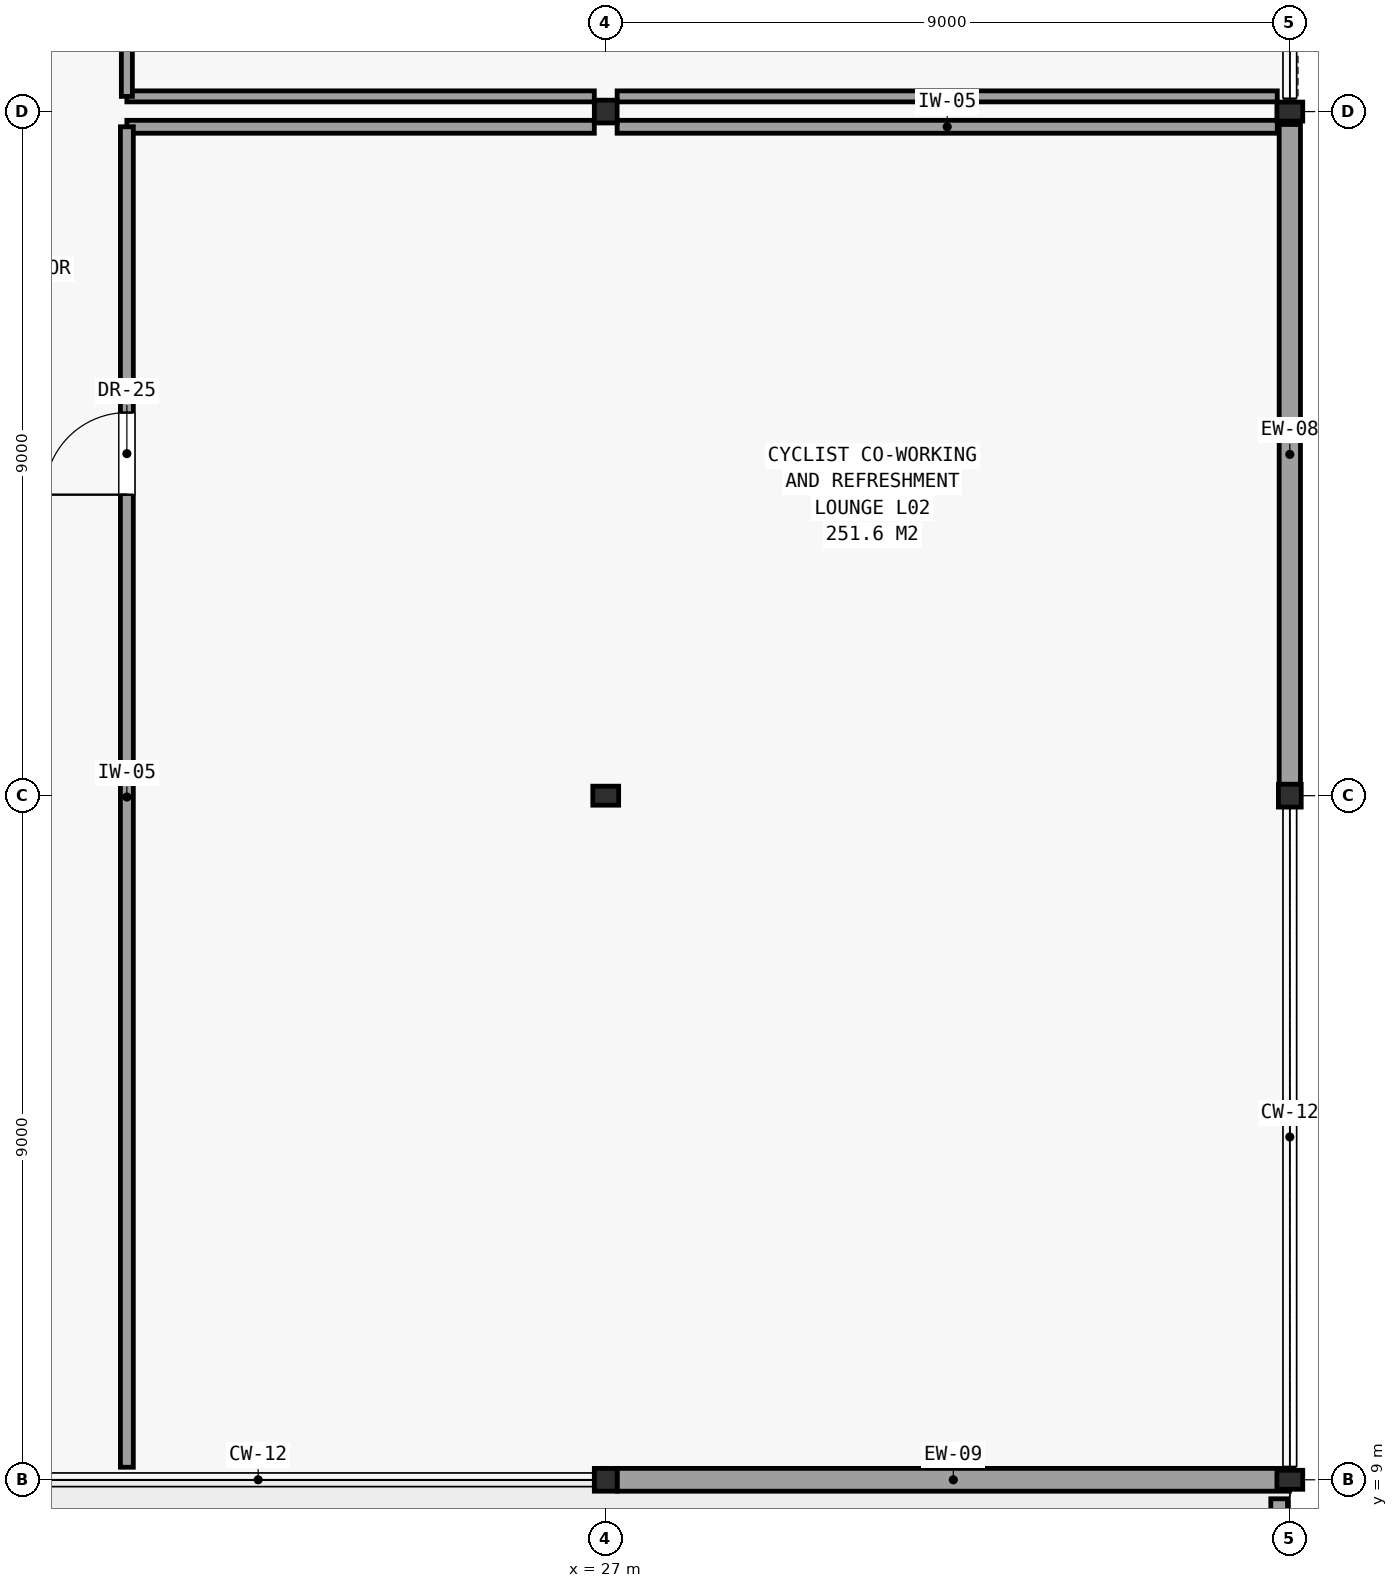
"""IFC4 building model, lengths in metres.
Left out: names, types, materials, properties, quantities, classifications, styles, units other than length and angle.
Written with IfcOpenShell. Run it as: python <this file> out.ifc"""

import sys

from ifc_helpers import new_model, si_unit, direction, frame, frame_2d, origin, origin_2d, place, context, subcontext, project, spatial, rectangle, hollow_rectangle, i_section, extrude, element, fill, save


model = new_model("IFC4")
c1 = context("Model", 3, precision=1e-05, world=origin(), true_north=direction((0.0, 1.0)))
c2 = subcontext(c1, "Body", "Model", "MODEL_VIEW")
j1 = project(units=[si_unit("LENGTHUNIT", "METRE"), si_unit("PLANEANGLEUNIT", "RADIAN")], contexts=[c1])
p1 = place(None, origin())
s1 = spatial("IfcSite", under=j1, at=p1, CompositionType="ELEMENT")
p2 = place(p1, origin())
s2 = spatial("IfcBuilding", under=s1, at=p2, CompositionType="ELEMENT")
p3 = place(p2, frame((0.0, 0.0, 9.3)))
s3 = spatial("IfcBuildingStorey", under=s2, at=p3, CompositionType="ELEMENT", Elevation=9.3)
p4 = place(p3, frame((27.0, 9.0, 0.0), z_axis=(0.0, 0.0, 1.0), x_axis=(1.0, 0.0, 0.0)))
e1 = element("IfcColumn", 1, at=p4, inside=s3, PredefinedType="COLUMN", context=c2, shape_type="SweptSolid", body=[
    extrude(hollow_rectangle(XDim=0.3, YDim=0.3, WallThickness=0.012, at=origin_2d()), origin(), (0.0, 0.0, 1.0), 4.14),
])
p5 = place(p3, frame((27.0, 18.0, 0.0), z_axis=(0.0, 0.0, 1.0), x_axis=(1.0, 0.0, 0.0)))
e2 = element("IfcColumn", 2, at=p5, inside=s3, PredefinedType="COLUMN", context=c2, shape_type="SweptSolid", body=[
    extrude(i_section(OverallWidth=0.25, OverallDepth=0.34, WebThickness=0.009, FlangeThickness=0.014, FilletRadius=0.01, at=origin_2d()), origin(), (0.0, 0.0, 1.0), 4.14),
])
p6 = place(p3, frame((27.0, 27.0, 0.0), z_axis=(0.0, 0.0, 1.0), x_axis=(1.0, 0.0, 0.0)))
e3 = element("IfcColumn", 3, at=p6, inside=s3, PredefinedType="COLUMN", context=c2, shape_type="SweptSolid", body=[
    extrude(hollow_rectangle(XDim=0.3, YDim=0.3, WallThickness=0.012, at=origin_2d()), origin(), (0.0, 0.0, 1.0), 4.14),
])
p7 = place(p3, frame((36.0, 9.0, 0.0), z_axis=(0.0, 0.0, 1.0), x_axis=(1.0, 0.0, 0.0)))
e4 = element("IfcColumn", 4, at=p7, inside=s3, PredefinedType="COLUMN", context=c2, shape_type="SweptSolid", body=[
    extrude(i_section(OverallWidth=0.25, OverallDepth=0.34, WebThickness=0.009, FlangeThickness=0.014, FilletRadius=0.01, at=origin_2d()), origin(), (0.0, 0.0, 1.0), 4.14),
])
p8 = place(p3, frame((36.0, 18.0, 0.0), z_axis=(0.0, 0.0, 1.0), x_axis=(1.0, 0.0, 0.0)))
e5 = element("IfcColumn", 5, at=p8, inside=s3, PredefinedType="COLUMN", context=c2, shape_type="SweptSolid", body=[
    extrude(hollow_rectangle(XDim=0.3, YDim=0.3, WallThickness=0.012, at=origin_2d()), origin(), (0.0, 0.0, 1.0), 4.14),
])
p9 = place(p3, frame((36.0, 27.0, 0.0), z_axis=(0.0, 0.0, 1.0), x_axis=(1.0, 0.0, 0.0)))
e6 = element("IfcColumn", 6, at=p9, inside=s3, PredefinedType="COLUMN", context=c2, shape_type="SweptSolid", body=[
    extrude(i_section(OverallWidth=0.25, OverallDepth=0.34, WebThickness=0.009, FlangeThickness=0.014, FilletRadius=0.01, at=origin_2d()), origin(), (0.0, 0.0, 1.0), 4.14),
])
p10 = place(p3, frame((27.15, 9.0, 0.0), z_axis=(0.0, 0.0, 1.0), x_axis=(1.0, 0.0, 0.0)))
e7 = element("IfcWall", 7, at=p10, inside=s3, PredefinedType="SOLIDWALL", context=c2, shape_type="SweptSolid", body=[
    extrude(rectangle(XDim=8.846, YDim=0.3, at=frame_2d((4.423, 0.0))), origin(), (0.0, 0.0, 1.0), 3.332),
])
p11 = place(p3, frame((36.0, 18.15, 0.0), z_axis=(0.0, 0.0, 1.0), x_axis=(0.0, 1.0, 0.0)))
e8 = element("IfcWall", 8, at=p11, inside=s3, PredefinedType="SOLIDWALL", context=c2, shape_type="SweptSolid", body=[
    extrude(rectangle(XDim=8.68, YDim=0.28, at=frame_2d((4.34, 0.0))), origin(), (0.0, 0.0, 1.0), 3.332),
])
p12 = place(p3, frame((35.86, 8.75, 0.0), z_axis=(0.0, 0.0, 1.0), x_axis=(0.0, -1.0, 0.0)))
e9 = element("IfcWall", 9, at=p12, inside=s3, PredefinedType="PARAPET", context=c2, shape_type="SweptSolid", body=[
    extrude(rectangle(XDim=8.61, YDim=0.22, at=frame_2d((4.305, 0.0))), origin(), (0.0, 0.0, 1.0), 0.52),
])
p13 = place(p3, frame((20.7, 26.8, 0.0), z_axis=(0.0, 0.0, 1.0), x_axis=(1.0, 0.0, 0.0)))
e10 = element("IfcWall", 10, at=p13, inside=s3, PredefinedType="PARTITIONING", context=c2, shape_type="SweptSolid", body=[
    extrude(rectangle(XDim=6.15, YDim=0.17, at=frame_2d((3.075, 0.0))), origin(), (0.0, 0.0, 1.0), 3.332),
])
p14 = place(p3, frame((27.15, 26.8, 0.0), z_axis=(0.0, 0.0, 1.0), x_axis=(1.0, 0.0, 0.0)))
e11 = element("IfcWall", 11, at=p14, inside=s3, PredefinedType="PARTITIONING", context=c2, shape_type="SweptSolid", body=[
    extrude(rectangle(XDim=8.685, YDim=0.17, at=frame_2d((4.343, 0.0))), origin(), (0.0, 0.0, 1.0), 3.332),
])
p15 = place(p3, frame((20.7, 9.165, 0.0), z_axis=(0.0, 0.0, 1.0), x_axis=(0.0, 1.0, 0.0)))
e12 = element("IfcWall", 12, at=p15, inside=s3, PredefinedType="PARTITIONING", context=c2, shape_type="SweptSolid", body=[
    extrude(rectangle(XDim=17.635, YDim=0.17, at=frame_2d((8.817, 0.0))), origin(), (0.0, 0.0, 1.0), 3.332),
])
p16 = place(p15, frame((12.795, 0.0, 0.0)))
e13 = element("IfcOpeningElement", 13, at=p16, cuts=e12, PredefinedType="OPENING", context=c2, shape_type="SweptSolid", body=[
    extrude(rectangle(XDim=1.08, YDim=2.15, at=frame_2d((0.54, 1.075))), frame((0.0, 0.096, 0.0), z_axis=(0.0, -1.0, 0.0), x_axis=(1.0, 0.0, 0.0)), (0.0, 0.0, 1.0), 0.192),
])
p17 = place(p3, frame((20.7, 27.2, 0.0), z_axis=(0.0, 0.0, 1.0), x_axis=(1.0, 0.0, 0.0)))
e14 = element("IfcWall", 14, at=p17, inside=s3, PredefinedType="PARTITIONING", context=c2, shape_type="SweptSolid", body=[
    extrude(rectangle(XDim=6.15, YDim=0.145, at=frame_2d((3.075, 0.0))), origin(), (0.0, 0.0, 1.0), 3.332),
])
p18 = place(p3, frame((27.15, 27.2, 0.0), z_axis=(0.0, 0.0, 1.0), x_axis=(1.0, 0.0, 0.0)))
e15 = element("IfcWall", 15, at=p18, inside=s3, PredefinedType="PARTITIONING", context=c2, shape_type="SweptSolid", body=[
    extrude(rectangle(XDim=8.685, YDim=0.145, at=frame_2d((4.343, 0.0))), origin(), (0.0, 0.0, 1.0), 3.332),
])
p19 = place(p3, frame((20.7, 27.2, 0.0), z_axis=(0.0, 0.0, 1.0), x_axis=(0.0, 1.0, 0.0)))
e16 = element("IfcWall", 16, at=p19, inside=s3, PredefinedType="PARTITIONING", context=c2, shape_type="SweptSolid", body=[
    extrude(rectangle(XDim=16.6, YDim=0.145, at=frame_2d((8.3, 0.0))), origin(), (0.0, 0.0, 1.0), 3.332),
])
p20 = place(p19, frame((12.03, 0.0, 0.0)))
e17 = element("IfcOpeningElement", 17, at=p20, cuts=e16, PredefinedType="OPENING", context=c2, shape_type="SweptSolid", body=[
    extrude(rectangle(XDim=1.14, YDim=2.2, at=frame_2d((0.57, 1.1))), frame((0.0, 0.083, 0.0), z_axis=(0.0, -1.0, 0.0), x_axis=(1.0, 0.0, 0.0)), (0.0, 0.0, 1.0), 0.167),
])
p21 = place(p16, origin())
e18 = element("IfcDoor", 18, at=p21, inside=s3, OperationType="SINGLE_SWING_LEFT", PredefinedType="DOOR", context=c2, shape_type="SweptSolid", body=[
    extrude(rectangle(XDim=1.08, YDim=2.15, at=frame_2d((0.54, 1.075))), frame((0.0, 0.025, 0.0), z_axis=(0.0, -1.0, 0.0), x_axis=(1.0, 0.0, 0.0)), (0.0, 0.0, 1.0), 0.05),
])
fill(e13, e18)
save(model, sys.argv[1])
